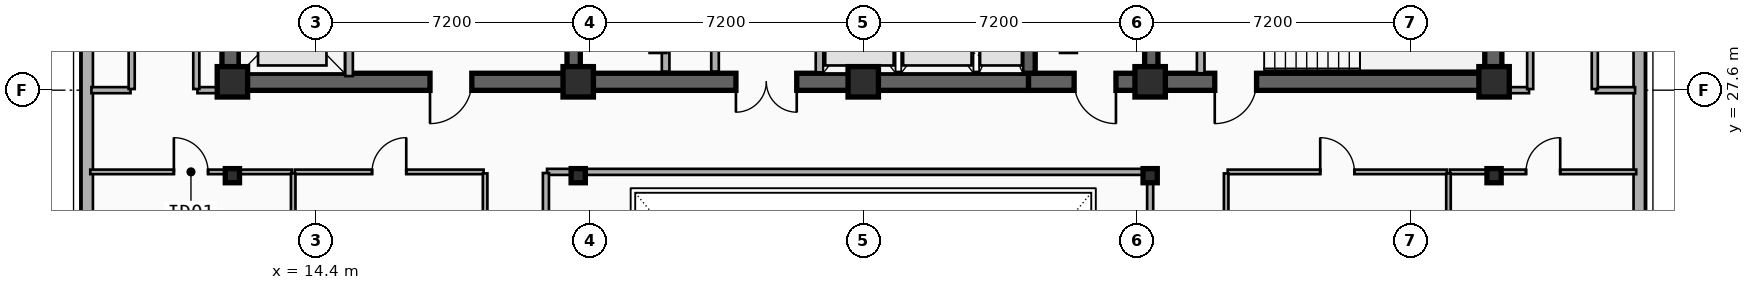
"""IFC4 building model, lengths in metres.
Left out: names, types, materials, properties, quantities, classifications, styles, units other than length and angle.
Written with IfcOpenShell. Run it as: python <this file> out.ifc"""

import sys

from ifc_helpers import new_model, si_unit, direction, frame, frame_2d, origin, origin_2d, place, context, subcontext, project, spatial, rectangle, i_section, extrude, element, fill, save


model = new_model("IFC4")
c1 = context("Model", 3, precision=1e-05, world=origin(), true_north=direction((0.0, 1.0)))
c2 = subcontext(c1, "Body", "Model", "MODEL_VIEW")
j1 = project(units=[si_unit("LENGTHUNIT", "METRE"), si_unit("PLANEANGLEUNIT", "RADIAN")], contexts=[c1])
p1 = place(None, origin())
s1 = spatial("IfcSite", under=j1, at=p1, CompositionType="ELEMENT")
p2 = place(p1, origin())
s2 = spatial("IfcBuilding", under=s1, at=p2, CompositionType="ELEMENT")
p3 = place(p2, frame((0.0, 0.0, 262.1)))
s3 = spatial("IfcBuildingStorey", under=s2, at=p3, CompositionType="ELEMENT", Elevation=262.1)
p4 = place(p3, frame((21.18, 27.82, 0.0), z_axis=(0.0, 0.0, 1.0), x_axis=(-1.0, 0.0, 0.0)))
e1 = element("IfcWall", 1, at=p4, inside=s3, PredefinedType="SHEAR", context=c2, shape_type="SweptSolid", body=[
    extrude(rectangle(XDim=9.03, YDim=0.45, at=frame_2d((4.515, 0.0))), origin(), (0.0, 0.0, 1.0), 3.7),
])
p5 = place(p4, frame((2.68, 0.0, 0.0)))
e2 = element("IfcOpeningElement", 2, at=p5, cuts=e1, PredefinedType="OPENING", context=c2, shape_type="SweptSolid", body=[
    extrude(rectangle(XDim=1.1, YDim=2.15, at=frame_2d((0.55, 1.075))), frame((0.0, 0.235, 0.0), z_axis=(0.0, -1.0, 0.0), x_axis=(1.0, 0.0, 0.0)), (0.0, 0.0, 1.0), 0.47),
])
p6 = place(p3, frame((33.15, 27.82, 0.0), z_axis=(0.0, 0.0, 1.0), x_axis=(-1.0, 0.0, 0.0)))
e3 = element("IfcWall", 3, at=p6, inside=s3, PredefinedType="SHEAR", context=c2, shape_type="SweptSolid", body=[
    extrude(rectangle(XDim=11.97, YDim=0.45, at=frame_2d((5.985, 0.0))), origin(), (0.0, 0.0, 1.0), 3.7),
])
p7 = place(p6, frame((6.1, 0.0, 0.0)))
e4 = element("IfcOpeningElement", 4, at=p7, cuts=e3, PredefinedType="OPENING", context=c2, shape_type="SweptSolid", body=[
    extrude(rectangle(XDim=1.6, YDim=2.2, at=frame_2d((0.8, 1.1))), frame((0.0, 0.235, 0.0), z_axis=(0.0, -1.0, 0.0), x_axis=(1.0, 0.0, 0.0)), (0.0, 0.0, 1.0), 0.47),
])
p8 = place(p3, frame((45.38, 27.82, 0.0), z_axis=(0.0, 0.0, 1.0), x_axis=(-1.0, 0.0, 0.0)))
e5 = element("IfcWall", 5, at=p8, inside=s3, PredefinedType="SHEAR", context=c2, shape_type="SweptSolid", body=[
    extrude(rectangle(XDim=12.23, YDim=0.45, at=frame_2d((6.115, 0.0))), origin(), (0.0, 0.0, 1.0), 3.7),
])
p9 = place(p8, frame((9.93, 0.0, 0.0)))
e6 = element("IfcOpeningElement", 6, at=p9, cuts=e5, PredefinedType="OPENING", context=c2, shape_type="SweptSolid", body=[
    extrude(rectangle(XDim=1.1, YDim=2.15, at=frame_2d((0.55, 1.075))), frame((0.0, 0.235, 0.0), z_axis=(0.0, -1.0, 0.0), x_axis=(1.0, 0.0, 0.0)), (0.0, 0.0, 1.0), 0.47),
])
p10 = place(p8, frame((6.23, 0.0, 0.0)))
e7 = element("IfcOpeningElement", 7, at=p10, cuts=e5, PredefinedType="OPENING", context=c2, shape_type="SweptSolid", body=[
    extrude(rectangle(XDim=1.1, YDim=2.15, at=frame_2d((0.55, 1.075))), frame((0.0, 0.235, 0.0), z_axis=(0.0, -1.0, 0.0), x_axis=(1.0, 0.0, 0.0)), (0.0, 0.0, 1.0), 0.47),
])
for number, where, z_axis, x_axis in (
    (8, (12.15, 28.045, 0.0), (0.0, 0.0, 1.0), (0.0, 1.0, 0.0)),
    (9, (45.38, 28.045, 0.0), (0.0, 0.0, 1.0), (0.0, 1.0, 0.0)),
):
    element("IfcWall", number, at=place(p3, frame(where, z_axis=z_axis, x_axis=x_axis)), inside=s3, PredefinedType="SHEAR", context=c2, shape_type="SweptSolid", body=[
        extrude(rectangle(XDim=8.78, YDim=0.45, at=frame_2d((4.39, 0.0))), origin(), (0.0, 0.0, 1.0), 3.7),
    ])
for number, where, z_axis, x_axis in (
    (10, (21.18, 28.045, 0.0), (0.0, 0.0, 1.0), (0.0, 1.0, 0.0)),
    (11, (33.15, 28.045, 0.0), (0.0, 0.0, 1.0), (0.0, 1.0, 0.0)),
):
    element("IfcWall", number, at=place(p3, frame(where, z_axis=z_axis, x_axis=x_axis)), inside=s3, PredefinedType="SHEAR", context=c2, shape_type="SweptSolid", body=[
        extrude(rectangle(XDim=8.78, YDim=0.35, at=frame_2d((4.39, 0.0))), origin(), (0.0, 0.0, 1.0), 3.7),
    ])
p11 = place(p3, frame((36.38, 28.045, 0.0), z_axis=(0.0, 0.0, 1.0), x_axis=(0.0, 1.0, 0.0)))
e12 = element("IfcWall", 12, at=p11, inside=s3, PredefinedType="SHEAR", context=c2, shape_type="SweptSolid", body=[
    extrude(rectangle(XDim=8.78, YDim=0.35, at=frame_2d((4.39, 0.0))), origin(), (0.0, 0.0, 1.0), 3.7),
])
p12 = place(p11, frame((3.735, 0.0, 0.0)))
e13 = element("IfcOpeningElement", 13, at=p12, cuts=e12, PredefinedType="OPENING", context=c2, shape_type="SweptSolid", body=[
    extrude(rectangle(XDim=1.1, YDim=2.15, at=frame_2d((0.55, 1.075))), frame((0.0, 0.185, 0.0), z_axis=(0.0, -1.0, 0.0), x_axis=(1.0, 0.0, 0.0)), (0.0, 0.0, 1.0), 0.37),
])
for number, where, z_axis, x_axis in (
    (14, (12.2, 27.82, 0.0), (0.0, 0.0, 1.0), (1.0, 0.0, 0.0)),
    (15, (21.3, 27.82, 0.0), (0.0, 0.0, 1.0), (1.0, 0.0, 0.0)),
    (16, (28.8, 27.82, 0.0), (0.0, 0.0, 1.0), (1.0, 0.0, 0.0)),
    (17, (36.35, 27.82, 0.0), (0.0, 0.0, 1.0), (1.0, 0.0, 0.0)),
    (18, (45.4, 27.82, 0.0), (0.0, 0.0, 1.0), (1.0, 0.0, 0.0)),
):
    element("IfcColumn", number, at=place(p3, frame(where, z_axis=z_axis, x_axis=x_axis)), inside=s3, PredefinedType="COLUMN", context=c2, shape_type="SweptSolid", body=[
        extrude(rectangle(XDim=0.8, YDim=0.8, at=origin_2d()), origin(), (0.0, 0.0, 1.0), 3.7),
    ])
for number, where, z_axis, x_axis in (
    (19, (12.2, 25.35, 0.0), (0.0, 0.0, 1.0), (1.0, 0.0, 0.0)),
    (20, (21.3, 25.35, 0.0), (0.0, 0.0, 1.0), (1.0, 0.0, 0.0)),
    (21, (36.35, 25.35, 0.0), (0.0, 0.0, 1.0), (1.0, 0.0, 0.0)),
    (22, (45.4, 25.35, 0.0), (0.0, 0.0, 1.0), (1.0, 0.0, 0.0)),
):
    element("IfcColumn", number, at=place(p3, frame(where, z_axis=z_axis, x_axis=x_axis)), inside=s3, PredefinedType="COLUMN", context=c2, shape_type="SweptSolid", body=[
        extrude(i_section(OverallWidth=0.374, OverallDepth=0.372, WebThickness=0.017, FlangeThickness=0.027, FilletRadius=0.015, at=origin_2d()), origin(), (0.0, 0.0, 1.0), 3.7),
    ])
p13 = place(p3, frame((49.22, 36.8, 0.0), z_axis=(0.0, 0.0, 1.0), x_axis=(0.0, -1.0, 0.0)))
e23 = element("IfcWall", 23, at=p13, inside=s3, PredefinedType="SOLIDWALL", context=c2, shape_type="SweptSolid", body=[
    extrude(rectangle(XDim=34.2, YDim=0.3, at=frame_2d((17.1, 0.0))), origin(), (0.0, 0.0, 1.0), 3.42),
])
p14 = place(p13, frame((17.66, 0.0, 0.75)))
e24 = element("IfcOpeningElement", 24, at=p14, cuts=e23, PredefinedType="OPENING", context=c2, shape_type="SweptSolid", body=[
    extrude(rectangle(XDim=2.1, YDim=2.1, at=frame_2d((1.05, 1.05))), frame((0.0, 0.16, 0.0), z_axis=(0.0, -1.0, 0.0), x_axis=(1.0, 0.0, 0.0)), (0.0, 0.0, 1.0), 0.32),
])
p15 = place(p13, frame((25.77, 0.0, 0.75)))
e25 = element("IfcOpeningElement", 25, at=p15, cuts=e23, PredefinedType="OPENING", context=c2, shape_type="SweptSolid", body=[
    extrude(rectangle(XDim=2.1, YDim=2.1, at=frame_2d((1.05, 1.05))), frame((0.0, 0.16, 0.0), z_axis=(0.0, -1.0, 0.0), x_axis=(1.0, 0.0, 0.0)), (0.0, 0.0, 1.0), 0.32),
])
p16 = place(p3, frame((8.38, 2.6, 0.0), z_axis=(0.0, 0.0, 1.0), x_axis=(0.0, 1.0, 0.0)))
e26 = element("IfcWall", 26, at=p16, inside=s3, PredefinedType="SOLIDWALL", context=c2, shape_type="SweptSolid", body=[
    extrude(rectangle(XDim=34.2, YDim=0.3, at=frame_2d((17.1, 0.0))), origin(), (0.0, 0.0, 1.0), 3.42),
])
p17 = place(p16, frame((6.33, 0.0, 0.75)))
e27 = element("IfcOpeningElement", 27, at=p17, cuts=e26, PredefinedType="OPENING", context=c2, shape_type="SweptSolid", body=[
    extrude(rectangle(XDim=2.1, YDim=2.1, at=frame_2d((1.05, 1.05))), frame((0.0, 0.16, 0.0), z_axis=(0.0, -1.0, 0.0), x_axis=(1.0, 0.0, 0.0)), (0.0, 0.0, 1.0), 0.32),
])
p18 = place(p16, frame((14.44, 0.0, 0.75)))
e28 = element("IfcOpeningElement", 28, at=p18, cuts=e26, PredefinedType="OPENING", context=c2, shape_type="SweptSolid", body=[
    extrude(rectangle(XDim=2.1, YDim=2.1, at=frame_2d((1.05, 1.05))), frame((0.0, 0.16, 0.0), z_axis=(0.0, -1.0, 0.0), x_axis=(1.0, 0.0, 0.0)), (0.0, 0.0, 1.0), 0.32),
])
p19 = place(p3, frame((15.27, 27.97, 0.0), z_axis=(0.0, 0.0, 1.0), x_axis=(0.0, 1.0, 0.0)))
e29 = element("IfcWall", 29, at=p19, inside=s3, PredefinedType="PARTITIONING", context=c2, shape_type="SweptSolid", body=[
    extrude(rectangle(XDim=2.96, YDim=0.2, at=frame_2d((1.48, 0.0))), origin(), (0.0, 0.0, 1.0), 2.49),
])
p20 = place(p19, frame((0.93, 0.0, 0.0)))
e30 = element("IfcOpeningElement", 30, at=p20, cuts=e29, PredefinedType="OPENING", context=c2, shape_type="SweptSolid", body=[
    extrude(rectangle(XDim=1.1, YDim=2.15, at=frame_2d((0.55, 1.075))), frame((0.0, 0.11, 0.0), z_axis=(0.0, -1.0, 0.0), x_axis=(1.0, 0.0, 0.0)), (0.0, 0.0, 1.0), 0.22),
])
p21 = place(p3, frame((27.65, 28.07, 0.0), z_axis=(0.0, 0.0, 1.0), x_axis=(0.0, 1.0, 0.0)))
e31 = element("IfcWall", 31, at=p21, inside=s3, PredefinedType="PARTITIONING", context=c2, shape_type="SweptSolid", body=[
    extrude(rectangle(XDim=2.58, YDim=0.2, at=frame_2d((1.29, 0.0))), origin(), (0.0, 0.0, 1.0), 2.49),
])
p22 = place(p3, frame((37.68, 28.045, 0.0), z_axis=(0.0, 0.0, 1.0), x_axis=(0.0, 1.0, 0.0)))
e32 = element("IfcWall", 32, at=p22, inside=s3, PredefinedType="PARTITIONING", context=c2, shape_type="SweptSolid", body=[
    extrude(rectangle(XDim=3.205, YDim=0.2, at=frame_2d((1.603, 0.0))), origin(), (0.0, 0.0, 1.0), 2.8),
])
p23 = place(p3, frame((24.9, 28.09, 0.0), z_axis=(0.0, 0.0, 1.0), x_axis=(0.0, 1.0, 0.0)))
e33 = element("IfcWall", 33, at=p23, inside=s3, PredefinedType="PARTITIONING", context=c2, shape_type="SweptSolid", body=[
    extrude(rectangle(XDim=2.62, YDim=0.2, at=frame_2d((1.31, 0.0))), origin(), (0.0, 0.0, 1.0), 2.8),
])
p24 = place(p23, frame((1.137, 0.0, 0.0)))
e34 = element("IfcOpeningElement", 34, at=p24, cuts=e33, PredefinedType="OPENING", context=c2, shape_type="SweptSolid", body=[
    extrude(rectangle(XDim=1.2, YDim=2.15, at=frame_2d((0.6, 1.075))), frame((0.0, 0.11, 0.0), z_axis=(0.0, -1.0, 0.0), x_axis=(1.0, 0.0, 0.0)), (0.0, 0.0, 1.0), 0.22),
])
p25 = place(p3, frame((23.6, 28.09, 0.0), z_axis=(0.0, 0.0, 1.0), x_axis=(0.0, 1.0, 0.0)))
e35 = element("IfcWall", 35, at=p25, inside=s3, PredefinedType="PARTITIONING", context=c2, shape_type="SweptSolid", body=[
    extrude(rectangle(XDim=2.62, YDim=0.2, at=frame_2d((1.31, 0.0))), origin(), (0.0, 0.0, 1.0), 2.8),
])
p26 = place(p3, frame((8.46, 25.45, 0.0), z_axis=(0.0, 0.0, 1.0), x_axis=(1.0, 0.0, 0.0)))
e36 = element("IfcWall", 36, at=p26, inside=s3, PredefinedType="PARTITIONING", context=c2, shape_type="SweptSolid", body=[
    extrude(rectangle(XDim=5.3, YDim=0.12, at=frame_2d((2.65, 0.0))), origin(), (0.0, 0.0, 1.0), 2.7),
])
p27 = place(p26, frame((2.2, 0.0, 0.0)))
e37 = element("IfcOpeningElement", 37, at=p27, cuts=e36, PredefinedType="OPENING", context=c2, shape_type="SweptSolid", body=[
    extrude(rectangle(XDim=0.9, YDim=2.1, at=frame_2d((0.45, 1.05))), frame((0.0, 0.07, 0.0), z_axis=(0.0, -1.0, 0.0), x_axis=(1.0, 0.0, 0.0)), (0.0, 0.0, 1.0), 0.14),
])
p28 = place(p3, frame((13.84, 25.45, 0.0), z_axis=(0.0, 0.0, 1.0), x_axis=(1.0, 0.0, 0.0)))
e38 = element("IfcWall", 38, at=p28, inside=s3, PredefinedType="PARTITIONING", context=c2, shape_type="SweptSolid", body=[
    extrude(rectangle(XDim=4.97, YDim=0.12, at=frame_2d((2.485, 0.0))), origin(), (0.0, 0.0, 1.0), 3.42),
])
p29 = place(p28, frame((2.035, 0.0, 0.0)))
e39 = element("IfcOpeningElement", 39, at=p29, cuts=e38, PredefinedType="OPENING", context=c2, shape_type="SweptSolid", body=[
    extrude(rectangle(XDim=0.9, YDim=2.1, at=frame_2d((0.45, 1.05))), frame((0.0, 0.07, 0.0), z_axis=(0.0, -1.0, 0.0), x_axis=(1.0, 0.0, 0.0)), (0.0, 0.0, 1.0), 0.14),
])
p30 = place(p3, frame((38.39, 25.45, 0.0), z_axis=(0.0, 0.0, 1.0), x_axis=(1.0, 0.0, 0.0)))
e40 = element("IfcWall", 40, at=p30, inside=s3, PredefinedType="PARTITIONING", context=c2, shape_type="SweptSolid", body=[
    extrude(rectangle(XDim=5.77, YDim=0.12, at=frame_2d((2.885, 0.0))), origin(), (0.0, 0.0, 1.0), 3.42),
])
p31 = place(p30, frame((2.435, 0.0, 0.0)))
e41 = element("IfcOpeningElement", 41, at=p31, cuts=e40, PredefinedType="OPENING", context=c2, shape_type="SweptSolid", body=[
    extrude(rectangle(XDim=0.9, YDim=2.1, at=frame_2d((0.45, 1.05))), frame((0.0, 0.07, 0.0), z_axis=(0.0, -1.0, 0.0), x_axis=(1.0, 0.0, 0.0)), (0.0, 0.0, 1.0), 0.14),
])
p32 = place(p3, frame((44.24, 25.45, 0.0), z_axis=(0.0, 0.0, 1.0), x_axis=(1.0, 0.0, 0.0)))
e42 = element("IfcWall", 42, at=p32, inside=s3, PredefinedType="PARTITIONING", context=c2, shape_type="SweptSolid", body=[
    extrude(rectangle(XDim=4.9, YDim=0.12, at=frame_2d((2.45, 0.0))), origin(), (0.0, 0.0, 1.0), 2.7),
])
p33 = place(p32, frame((2.0, 0.0, 0.0)))
e43 = element("IfcOpeningElement", 43, at=p33, cuts=e42, PredefinedType="OPENING", context=c2, shape_type="SweptSolid", body=[
    extrude(rectangle(XDim=0.9, YDim=2.1, at=frame_2d((0.45, 1.05))), frame((0.0, 0.07, 0.0), z_axis=(0.0, -1.0, 0.0), x_axis=(1.0, 0.0, 0.0)), (0.0, 0.0, 1.0), 0.14),
])
p34 = place(p3, frame((18.85, 8.89, 0.0), z_axis=(0.0, 0.0, 1.0), x_axis=(0.0, 1.0, 0.0)))
e44 = element("IfcWall", 44, at=p34, inside=s3, PredefinedType="PARTITIONING", context=c2, shape_type="SweptSolid", body=[
    extrude(rectangle(XDim=16.52, YDim=0.12, at=frame_2d((8.26, 0.0))), origin(), (0.0, 0.0, 1.0), 3.0),
])
p35 = place(p34, frame((7.81, 0.0, 0.0)))
e45 = element("IfcOpeningElement", 45, at=p35, cuts=e44, PredefinedType="OPENING", context=c2, shape_type="SweptSolid", body=[
    extrude(rectangle(XDim=0.9, YDim=2.1, at=frame_2d((0.45, 1.05))), frame((0.0, 0.07, 0.0), z_axis=(0.0, -1.0, 0.0), x_axis=(1.0, 0.0, 0.0)), (0.0, 0.0, 1.0), 0.14),
])
p36 = place(p3, frame((38.35, 8.89, 0.0), z_axis=(0.0, 0.0, 1.0), x_axis=(0.0, 1.0, 0.0)))
e46 = element("IfcWall", 46, at=p36, inside=s3, PredefinedType="PARTITIONING", context=c2, shape_type="SweptSolid", body=[
    extrude(rectangle(XDim=16.52, YDim=0.12, at=frame_2d((8.26, 0.0))), origin(), (0.0, 0.0, 1.0), 3.0),
])
p37 = place(p36, frame((7.81, 0.0, 0.0)))
e47 = element("IfcOpeningElement", 47, at=p37, cuts=e46, PredefinedType="OPENING", context=c2, shape_type="SweptSolid", body=[
    extrude(rectangle(XDim=0.9, YDim=2.1, at=frame_2d((0.45, 1.05))), frame((0.0, 0.07, 0.0), z_axis=(0.0, -1.0, 0.0), x_axis=(1.0, 0.0, 0.0)), (0.0, 0.0, 1.0), 0.14),
])
for number, where, z_axis, x_axis in (
    (48, (13.8, -1.34, 0.0), (0.0, 0.0, 1.0), (0.0, 1.0, 0.0)),
    (49, (44.2, -1.34, 0.0), (0.0, 0.0, 1.0), (0.0, 1.0, 0.0)),
):
    element("IfcWall", number, at=place(p3, frame(where, z_axis=z_axis, x_axis=x_axis)), inside=s3, PredefinedType="PARTITIONING", context=c2, shape_type="SweptSolid", body=[
        extrude(rectangle(XDim=26.75, YDim=0.12, at=frame_2d((13.375, 0.0))), origin(), (0.0, 0.0, 1.0), 3.0),
    ])
p38 = place(p3, frame((20.48, 25.45, 0.0), z_axis=(0.0, 0.0, 1.0), x_axis=(1.0, 0.0, 0.0)))
e50 = element("IfcWall", 50, at=p38, inside=s3, PredefinedType="PARTITIONING", context=c2, shape_type="SweptSolid", body=[
    extrude(rectangle(XDim=15.84, YDim=0.16, at=frame_2d((7.92, 0.0))), origin(), (0.0, 0.0, 1.0), 2.7),
])
p39 = place(p3, frame((8.49, 27.6, 0.0), z_axis=(0.0, 0.0, 1.0), x_axis=(1.0, 0.0, 0.0)))
e51 = element("IfcWall", 51, at=p39, inside=s3, PredefinedType="PARTITIONING", context=c2, shape_type="SweptSolid", body=[
    extrude(rectangle(XDim=1.03, YDim=0.16, at=frame_2d((0.515, 0.0))), origin(), (0.0, 0.0, 1.0), 3.42),
])
p40 = place(p3, frame((11.28, 27.6, 0.0), z_axis=(0.0, 0.0, 1.0), x_axis=(1.0, 0.0, 0.0)))
e52 = element("IfcWall", 52, at=p40, inside=s3, PredefinedType="PARTITIONING", context=c2, shape_type="SweptSolid", body=[
    extrude(rectangle(XDim=0.84, YDim=0.16, at=frame_2d((0.42, 0.0))), origin(), (0.0, 0.0, 1.0), 2.49),
])
p41 = place(p3, frame((45.41, 27.6, 0.0), z_axis=(0.0, 0.0, 1.0), x_axis=(1.0, 0.0, 0.0)))
e53 = element("IfcWall", 53, at=p41, inside=s3, PredefinedType="PARTITIONING", context=c2, shape_type="SweptSolid", body=[
    extrude(rectangle(XDim=0.91, YDim=0.16, at=frame_2d((0.455, 0.0))), origin(), (0.0, 0.0, 1.0), 2.49),
])
p42 = place(p3, frame((48.08, 27.6, 0.0), z_axis=(0.0, 0.0, 1.0), x_axis=(1.0, 0.0, 0.0)))
e54 = element("IfcWall", 54, at=p42, inside=s3, PredefinedType="PARTITIONING", context=c2, shape_type="SweptSolid", body=[
    extrude(rectangle(XDim=1.03, YDim=0.16, at=frame_2d((0.515, 0.0))), origin(), (0.0, 0.0, 1.0), 3.42),
])
p43 = place(p3, frame((20.45, 10.43, 0.0), z_axis=(0.0, 0.0, 1.0), x_axis=(0.0, 1.0, 0.0)))
e55 = element("IfcWall", 55, at=p43, inside=s3, PredefinedType="PARTITIONING", context=c2, shape_type="SweptSolid", body=[
    extrude(rectangle(XDim=14.99, YDim=0.16, at=frame_2d((7.495, 0.0))), origin(), (0.0, 0.0, 1.0), 3.0),
])
p44 = place(p3, frame((36.35, 10.43, 0.0), z_axis=(0.0, 0.0, 1.0), x_axis=(0.0, 1.0, 0.0)))
e56 = element("IfcWall", 56, at=p44, inside=s3, PredefinedType="PARTITIONING", context=c2, shape_type="SweptSolid", body=[
    extrude(rectangle(XDim=14.99, YDim=0.16, at=frame_2d((7.495, 0.0))), origin(), (0.0, 0.0, 1.0), 2.7),
])
for number, where, z_axis, x_axis in (
    (57, (9.55, 27.63, 0.0), (0.0, 0.0, 1.0), (0.0, 1.0, 0.0)),
    (58, (11.25, 27.63, 0.0), (0.0, 0.0, 1.0), (0.0, 1.0, 0.0)),
    (59, (46.35, 27.63, 0.0), (0.0, 0.0, 1.0), (0.0, 1.0, 0.0)),
    (60, (48.05, 27.63, 0.0), (0.0, 0.0, 1.0), (0.0, 1.0, 0.0)),
):
    element("IfcWall", number, at=place(p3, frame(where, z_axis=z_axis, x_axis=x_axis)), inside=s3, PredefinedType="PARTITIONING", context=c2, shape_type="SweptSolid", body=[
        extrude(rectangle(XDim=10.24, YDim=0.16, at=frame_2d((5.12, 0.0))), origin(), (0.0, 0.0, 1.0), 2.9),
    ])
p45 = place(p5, origin())
e61 = element("IfcDoor", 61, at=p45, inside=s3, OperationType="SINGLE_SWING_RIGHT", PredefinedType="DOOR", context=c2, shape_type="SweptSolid", body=[
    extrude(rectangle(XDim=1.1, YDim=2.15, at=frame_2d((0.55, 1.075))), frame((0.0, 0.025, 0.0), z_axis=(0.0, -1.0, 0.0), x_axis=(1.0, 0.0, 0.0)), (0.0, 0.0, 1.0), 0.05),
])
fill(e2, e61)
p46 = place(p9, origin())
e62 = element("IfcDoor", 62, at=p46, inside=s3, OperationType="SINGLE_SWING_LEFT", PredefinedType="DOOR", context=c2, shape_type="SweptSolid", body=[
    extrude(rectangle(XDim=1.1, YDim=2.15, at=frame_2d((0.55, 1.075))), frame((0.0, 0.025, 0.0), z_axis=(0.0, -1.0, 0.0), x_axis=(1.0, 0.0, 0.0)), (0.0, 0.0, 1.0), 0.05),
])
fill(e6, e62)
p47 = place(p10, origin())
e63 = element("IfcDoor", 63, at=p47, inside=s3, OperationType="SINGLE_SWING_RIGHT", PredefinedType="DOOR", context=c2, shape_type="SweptSolid", body=[
    extrude(rectangle(XDim=1.1, YDim=2.15, at=frame_2d((0.55, 1.075))), frame((0.0, 0.025, 0.0), z_axis=(0.0, -1.0, 0.0), x_axis=(1.0, 0.0, 0.0)), (0.0, 0.0, 1.0), 0.05),
])
fill(e7, e63)
p48 = place(p7, origin())
e64 = element("IfcDoor", 64, at=p48, inside=s3, OperationType="SINGLE_SWING_LEFT", PredefinedType="DOOR", context=c2, shape_type="SweptSolid", body=[
    extrude(rectangle(XDim=1.6, YDim=2.2, at=frame_2d((0.8, 1.1))), frame((0.0, 0.025, 0.0), z_axis=(0.0, -1.0, 0.0), x_axis=(1.0, 0.0, 0.0)), (0.0, 0.0, 1.0), 0.05),
])
fill(e4, e64)
p49 = place(p27, origin())
e65 = element("IfcDoor", 65, at=p49, inside=s3, OperationType="SINGLE_SWING_LEFT", PredefinedType="DOOR", context=c2, shape_type="SweptSolid", body=[
    extrude(rectangle(XDim=0.9, YDim=2.1, at=frame_2d((0.45, 1.05))), frame((0.0, 0.025, 0.0), z_axis=(0.0, -1.0, 0.0), x_axis=(1.0, 0.0, 0.0)), (0.0, 0.0, 1.0), 0.05),
])
fill(e37, e65)
p50 = place(p29, origin())
e66 = element("IfcDoor", 66, at=p50, inside=s3, OperationType="SINGLE_SWING_RIGHT", PredefinedType="DOOR", context=c2, shape_type="SweptSolid", body=[
    extrude(rectangle(XDim=0.9, YDim=2.1, at=frame_2d((0.45, 1.05))), frame((0.0, 0.025, 0.0), z_axis=(0.0, -1.0, 0.0), x_axis=(1.0, 0.0, 0.0)), (0.0, 0.0, 1.0), 0.05),
])
fill(e39, e66)
p51 = place(p31, origin())
e67 = element("IfcDoor", 67, at=p51, inside=s3, OperationType="SINGLE_SWING_LEFT", PredefinedType="DOOR", context=c2, shape_type="SweptSolid", body=[
    extrude(rectangle(XDim=0.9, YDim=2.1, at=frame_2d((0.45, 1.05))), frame((0.0, 0.025, 0.0), z_axis=(0.0, -1.0, 0.0), x_axis=(1.0, 0.0, 0.0)), (0.0, 0.0, 1.0), 0.05),
])
fill(e41, e67)
p52 = place(p33, origin())
e68 = element("IfcDoor", 68, at=p52, inside=s3, OperationType="SINGLE_SWING_RIGHT", PredefinedType="DOOR", context=c2, shape_type="SweptSolid", body=[
    extrude(rectangle(XDim=0.9, YDim=2.1, at=frame_2d((0.45, 1.05))), frame((0.0, 0.025, 0.0), z_axis=(0.0, -1.0, 0.0), x_axis=(1.0, 0.0, 0.0)), (0.0, 0.0, 1.0), 0.05),
])
fill(e43, e68)
save(model, sys.argv[1])
